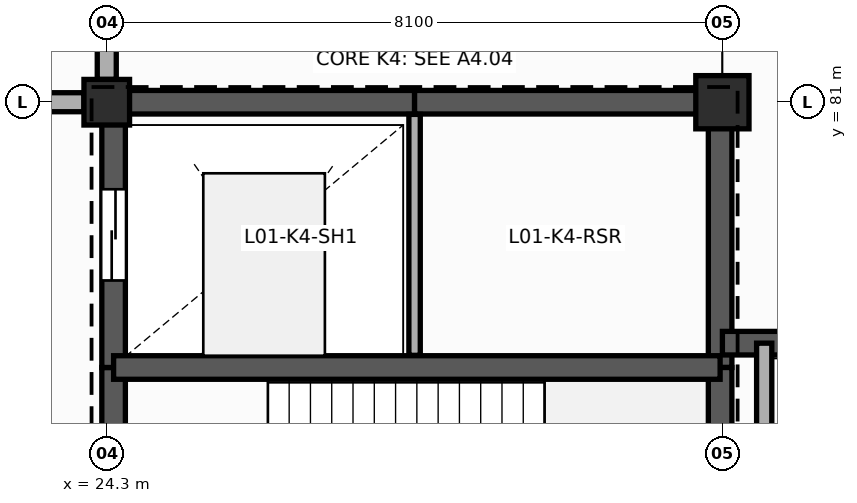
"""IFC4 building model, lengths in metres.
Left out: names, types, materials, properties, quantities, classifications, styles, units other than length and angle.
Written with IfcOpenShell. Run it as: python <this file> out.ifc"""

import sys

from ifc_helpers import new_model, si_unit, direction, frame, frame_2d, origin, origin_2d, place, context, subcontext, project, spatial, rectangle, extrude, element, fill, save


model = new_model("IFC4")
c1 = context("Model", 3, precision=1e-05, world=origin(), true_north=direction((0.0, 1.0)))
c2 = subcontext(c1, "Body", "Model", "MODEL_VIEW")
j1 = project(units=[si_unit("LENGTHUNIT", "METRE"), si_unit("PLANEANGLEUNIT", "RADIAN")], contexts=[c1])
p1 = place(None, origin())
s1 = spatial("IfcSite", under=j1, at=p1, CompositionType="ELEMENT")
p2 = place(p1, origin())
s2 = spatial("IfcBuilding", under=s1, at=p2, CompositionType="ELEMENT")
p3 = place(p2, frame((0.0, 0.0, 5.4)))
s3 = spatial("IfcBuildingStorey", under=s2, at=p3, CompositionType="ELEMENT", Elevation=5.4)
p4 = place(p3, frame((24.3, 81.0, 0.0), z_axis=(0.0, 0.0, 1.0), x_axis=(1.0, 0.0, 0.0)))
e1 = element("IfcColumn", 1, at=p4, inside=s3, PredefinedType="COLUMN", context=c2, shape_type="SweptSolid", body=[
    extrude(rectangle(XDim=0.6, YDim=0.6, at=origin_2d()), origin(), (0.0, 0.0, 1.0), 4.8),
])
p5 = place(p3, frame((32.4, 81.0, 0.0), z_axis=(0.0, 0.0, 1.0), x_axis=(1.0, 0.0, 0.0)))
e2 = element("IfcColumn", 2, at=p5, inside=s3, PredefinedType="COLUMN", context=c2, shape_type="SweptSolid", body=[
    extrude(rectangle(XDim=0.7, YDim=0.7, at=origin_2d()), origin(), (0.0, 0.0, 1.0), 4.8),
])
p6 = place(p3, frame((24.39, 73.15, 0.0), z_axis=(0.0, 0.0, 1.0), x_axis=(0.0, 1.0, 0.0)))
e3 = element("IfcWall", 3, at=p6, inside=s3, PredefinedType="SHEAR", context=c2, shape_type="SweptSolid", body=[
    extrude(rectangle(XDim=4.36, YDim=0.31, at=frame_2d((2.18, 0.0))), origin(), (0.0, 0.0, 1.0), 4.8),
])
p7 = place(p6, frame((1.35, 0.0, 0.0)))
e4 = element("IfcOpeningElement", 4, at=p7, cuts=e3, PredefinedType="OPENING", context=c2, shape_type="SweptSolid", body=[
    extrude(rectangle(XDim=1.2, YDim=2.25, at=frame_2d((0.6, 1.125))), frame((0.0, 0.165, 0.0), z_axis=(0.0, -1.0, 0.0), x_axis=(1.0, 0.0, 0.0)), (0.0, 0.0, 1.0), 0.33),
])
p8 = place(p3, frame((24.39, 77.51, 0.0), z_axis=(0.0, 0.0, 1.0), x_axis=(0.0, 1.0, 0.0)))
e5 = element("IfcWall", 5, at=p8, inside=s3, PredefinedType="SHEAR", context=c2, shape_type="SweptSolid", body=[
    extrude(rectangle(XDim=3.49, YDim=0.31, at=frame_2d((1.745, 0.0))), origin(), (0.0, 0.0, 1.0), 4.8),
])
p9 = place(p8, frame((1.145, 0.0, 0.0)))
e6 = element("IfcOpeningElement", 6, at=p9, cuts=e5, PredefinedType="OPENING", context=c2, shape_type="SweptSolid", body=[
    extrude(rectangle(XDim=1.2, YDim=2.2, at=frame_2d((0.6, 1.1))), frame((0.0, 0.165, 0.0), z_axis=(0.0, -1.0, 0.0), x_axis=(1.0, 0.0, 0.0)), (0.0, 0.0, 1.0), 0.33),
])
p10 = place(p3, frame((24.39, 81.0, 0.0), z_axis=(0.0, 0.0, 1.0), x_axis=(1.0, 0.0, 0.0)))
e7 = element("IfcWall", 7, at=p10, inside=s3, PredefinedType="SHEAR", context=c2, shape_type="SweptSolid", body=[
    extrude(rectangle(XDim=3.96, YDim=0.31, at=frame_2d((1.98, 0.0))), origin(), (0.0, 0.0, 1.0), 4.8),
])
p11 = place(p3, frame((28.35, 81.0, 0.0), z_axis=(0.0, 0.0, 1.0), x_axis=(1.0, 0.0, 0.0)))
e8 = element("IfcWall", 8, at=p11, inside=s3, PredefinedType="SHEAR", context=c2, shape_type="SweptSolid", body=[
    extrude(rectangle(XDim=4.02, YDim=0.31, at=frame_2d((2.01, 0.0))), origin(), (0.0, 0.0, 1.0), 4.8),
])
p12 = place(p3, frame((32.37, 81.0, 0.0), z_axis=(0.0, 0.0, 1.0), x_axis=(0.0, -1.0, 0.0)))
e9 = element("IfcWall", 9, at=p12, inside=s3, PredefinedType="SHEAR", context=c2, shape_type="SweptSolid", body=[
    extrude(rectangle(XDim=3.49, YDim=0.31, at=frame_2d((1.745, 0.0))), origin(), (0.0, 0.0, 1.0), 4.8),
])
p13 = place(p3, frame((32.37, 77.51, 0.0), z_axis=(0.0, 0.0, 1.0), x_axis=(0.0, -1.0, 0.0)))
e10 = element("IfcWall", 10, at=p13, inside=s3, PredefinedType="SHEAR", context=c2, shape_type="SweptSolid", body=[
    extrude(rectangle(XDim=4.36, YDim=0.31, at=frame_2d((2.18, 0.0))), origin(), (0.0, 0.0, 1.0), 4.8),
])
p14 = place(p3, frame((24.39, 77.51, 0.0), z_axis=(0.0, 0.0, 1.0), x_axis=(1.0, 0.0, 0.0)))
e11 = element("IfcWall", 11, at=p14, inside=s3, PredefinedType="SHEAR", context=c2, shape_type="SweptSolid", body=[
    extrude(rectangle(XDim=7.98, YDim=0.31, at=frame_2d((3.99, 0.0))), origin(), (0.0, 0.0, 1.0), 4.8),
])
p15 = place(p3, frame((28.35, 77.67, 0.0), z_axis=(0.0, 0.0, 1.0), x_axis=(0.0, 1.0, 0.0)))
e12 = element("IfcWall", 12, at=p15, inside=s3, PredefinedType="PLUMBINGWALL", context=c2, shape_type="SweptSolid", body=[
    extrude(rectangle(XDim=3.17, YDim=0.15, at=frame_2d((1.585, 0.0))), origin(), (0.0, 0.0, 1.0), 4.45),
])
p16 = place(p3, frame((41.195, 77.83, 0.0), z_axis=(0.0, 0.0, 1.0), x_axis=(-1.0, 0.0, 0.0)))
e13 = element("IfcWall", 13, at=p16, inside=s3, PredefinedType="SHEAR", context=c2, shape_type="SweptSolid", body=[
    extrude(rectangle(XDim=8.795, YDim=0.31, at=frame_2d((4.397, 0.0))), origin(), (0.0, 0.0, 1.0), 4.8),
])
p17 = place(p3, frame((32.95, 73.35, 0.0), z_axis=(0.0, 0.0, 1.0), x_axis=(0.0, 1.0, 0.0)))
e14 = element("IfcWall", 14, at=p17, inside=s3, PredefinedType="PARTITIONING", context=c2, shape_type="SweptSolid", body=[
    extrude(rectangle(XDim=4.48, YDim=0.2, at=frame_2d((2.24, 0.0))), origin(), (0.0, 0.0, 1.0), 4.45),
])
p18 = place(p17, frame((1.25, 0.0, 0.0)))
e15 = element("IfcOpeningElement", 15, at=p18, cuts=e14, PredefinedType="OPENING", context=c2, shape_type="SweptSolid", body=[
    extrude(rectangle(XDim=1.2, YDim=2.25, at=frame_2d((0.6, 1.125))), frame((0.0, 0.11, 0.0), z_axis=(0.0, -1.0, 0.0), x_axis=(1.0, 0.0, 0.0)), (0.0, 0.0, 1.0), 0.22),
])
p19 = place(p3, frame((16.5, 81.0, 0.0), z_axis=(0.0, 0.0, 1.0), x_axis=(1.0, 0.0, 0.0)))
e16 = element("IfcWall", 16, at=p19, inside=s3, PredefinedType="SOLIDWALL", context=c2, shape_type="SweptSolid", body=[
    extrude(rectangle(XDim=7.5, YDim=0.25, at=frame_2d((3.75, 0.0))), origin(), (0.0, 0.0, 1.0), 4.085),
])
p20 = place(p19, frame((2.8, 0.0, 0.0)))
e17 = element("IfcOpeningElement", 17, at=p20, cuts=e16, PredefinedType="OPENING", context=c2, shape_type="SweptSolid", body=[
    extrude(rectangle(XDim=1.9, YDim=2.4, at=frame_2d((0.95, 1.2))), frame((0.0, 0.135, 0.0), z_axis=(0.0, -1.0, 0.0), x_axis=(1.0, 0.0, 0.0)), (0.0, 0.0, 1.0), 0.27),
])
p21 = place(p3, frame((24.3, 81.3, 0.0), z_axis=(0.0, 0.0, 1.0), x_axis=(0.0, 1.0, 0.0)))
e18 = element("IfcWall", 18, at=p21, inside=s3, PredefinedType="SOLIDWALL", context=c2, shape_type="SweptSolid", body=[
    extrude(rectangle(XDim=7.5, YDim=0.25, at=frame_2d((3.75, 0.0))), origin(), (0.0, 0.0, 1.0), 4.197),
])
p22 = place(p9, origin())
e19 = element("IfcDoor", 19, at=p22, inside=s3, OperationType="SLIDING_TO_LEFT", PredefinedType="DOOR", context=c2, shape_type="SweptSolid", body=[
    extrude(rectangle(XDim=1.2, YDim=2.2, at=frame_2d((0.6, 1.1))), frame((0.0, 0.025, 0.0), z_axis=(0.0, -1.0, 0.0), x_axis=(1.0, 0.0, 0.0)), (0.0, 0.0, 1.0), 0.05),
])
fill(e6, e19)
save(model, sys.argv[1])
